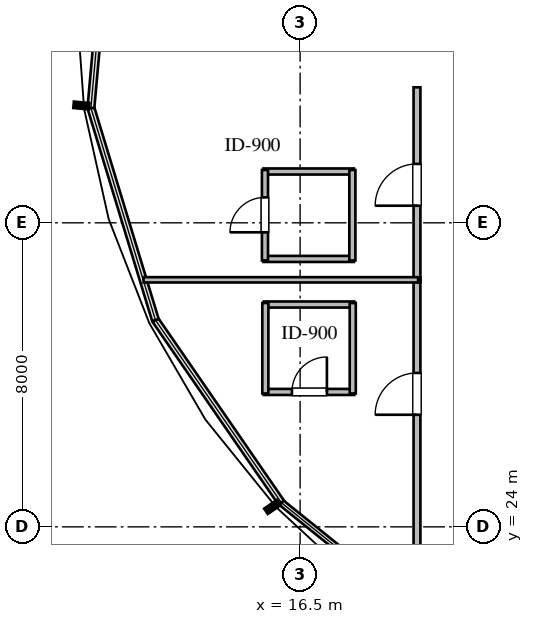
"""IFC4 building model, lengths in metres.
Left out: names, types, materials, properties, quantities, classifications, styles, units other than length and angle.
Written with IfcOpenShell. Run it as: python <this file> out.ifc"""

import sys

from ifc_helpers import new_model, si_unit, direction, frame, frame_2d, origin, place, context, subcontext, project, spatial, rectangle, extrude, element, fill, save


model = new_model("IFC4")
c1 = context("Model", 3, precision=1e-05, world=origin(), true_north=direction((0.0, 1.0)))
c2 = subcontext(c1, "Body", "Model", "MODEL_VIEW")
j1 = project(units=[si_unit("LENGTHUNIT", "METRE"), si_unit("PLANEANGLEUNIT", "RADIAN")], contexts=[c1])
p1 = place(None, origin())
s1 = spatial("IfcSite", under=j1, at=p1, CompositionType="ELEMENT")
p2 = place(p1, origin())
s2 = spatial("IfcBuilding", under=s1, at=p2, CompositionType="ELEMENT")
p3 = place(p2, frame((0.0, 0.0, 149.4)))
s3 = spatial("IfcBuildingStorey", under=s2, at=p3, CompositionType="ELEMENT", Elevation=149.4)
p4 = place(p3, frame((15.545, 27.55, 0.0), z_axis=(0.0, 0.0, 1.0), x_axis=(1.0, 0.0, 0.0)))
e1 = element("IfcWall", 1, at=p4, inside=s3, PredefinedType="PLUMBINGWALL", context=c2, shape_type="SweptSolid", body=[
    extrude(rectangle(XDim=2.38, YDim=0.16, at=frame_2d((1.19, 0.0))), origin(), (0.0, 0.0, 1.0), 3.36),
])
p5 = place(p4, frame((0.74, 0.0, 0.0)))
e2 = element("IfcOpeningElement", 2, at=p5, cuts=e1, PredefinedType="OPENING", context=c2, shape_type="SweptSolid", body=[
    extrude(rectangle(XDim=0.92, YDim=2.1, at=frame_2d((0.46, 1.05))), frame((0.0, 0.09, 0.0), z_axis=(0.0, -1.0, 0.0), x_axis=(1.0, 0.0, 0.0)), (0.0, 0.0, 1.0), 0.18),
])
p6 = place(p3, frame((15.545, 29.85, 0.0), z_axis=(0.0, 0.0, 1.0), x_axis=(1.0, 0.0, 0.0)))
e3 = element("IfcWall", 3, at=p6, inside=s3, PredefinedType="PLUMBINGWALL", context=c2, shape_type="SweptSolid", body=[
    extrude(rectangle(XDim=2.38, YDim=0.16, at=frame_2d((1.19, 0.0))), origin(), (0.0, 0.0, 1.0), 3.36),
])
for number, where, z_axis, x_axis in (
    (4, (15.585, 27.51, 0.0), (0.0, 0.0, 1.0), (0.0, 1.0, 0.0)),
    (5, (17.885, 27.51, 0.0), (0.0, 0.0, 1.0), (0.0, 1.0, 0.0)),
):
    element("IfcWall", number, at=place(p3, frame(where, z_axis=z_axis, x_axis=x_axis)), inside=s3, PredefinedType="PLUMBINGWALL", context=c2, shape_type="SweptSolid", body=[
        extrude(rectangle(XDim=2.38, YDim=0.16, at=frame_2d((1.19, 0.0))), origin(), (0.0, 0.0, 1.0), 3.36),
    ])
for number, where, z_axis, x_axis in (
    (6, (15.535, 31.05, 0.0), (0.0, 0.0, 1.0), (1.0, 0.0, 0.0)),
    (7, (15.535, 33.35, 0.0), (0.0, 0.0, 1.0), (1.0, 0.0, 0.0)),
):
    element("IfcWall", number, at=place(p3, frame(where, z_axis=z_axis, x_axis=x_axis)), inside=s3, PredefinedType="PLUMBINGWALL", context=c2, shape_type="SweptSolid", body=[
        extrude(rectangle(XDim=2.38, YDim=0.16, at=frame_2d((1.19, 0.0))), origin(), (0.0, 0.0, 1.0), 3.36),
    ])
p7 = place(p3, frame((15.575, 31.01, 0.0), z_axis=(0.0, 0.0, 1.0), x_axis=(0.0, 1.0, 0.0)))
e8 = element("IfcWall", 8, at=p7, inside=s3, PredefinedType="PLUMBINGWALL", context=c2, shape_type="SweptSolid", body=[
    extrude(rectangle(XDim=2.38, YDim=0.16, at=frame_2d((1.19, 0.0))), origin(), (0.0, 0.0, 1.0), 3.36),
])
p8 = place(p7, frame((0.74, 0.0, 0.0)))
e9 = element("IfcOpeningElement", 9, at=p8, cuts=e8, PredefinedType="OPENING", context=c2, shape_type="SweptSolid", body=[
    extrude(rectangle(XDim=0.92, YDim=2.1, at=frame_2d((0.46, 1.05))), frame((0.0, 0.09, 0.0), z_axis=(0.0, -1.0, 0.0), x_axis=(1.0, 0.0, 0.0)), (0.0, 0.0, 1.0), 0.18),
])
p9 = place(p3, frame((17.875, 31.01, 0.0), z_axis=(0.0, 0.0, 1.0), x_axis=(0.0, 1.0, 0.0)))
e10 = element("IfcWall", 10, at=p9, inside=s3, PredefinedType="PLUMBINGWALL", context=c2, shape_type="SweptSolid", body=[
    extrude(rectangle(XDim=2.38, YDim=0.16, at=frame_2d((1.19, 0.0))), origin(), (0.0, 0.0, 1.0), 3.36),
])
p10 = place(p3, frame((19.575, 21.775, 0.0), z_axis=(0.0, 0.0, 1.0), x_axis=(0.0, 1.0, 0.0)))
e11 = element("IfcWall", 11, at=p10, inside=s3, PredefinedType="PARTITIONING", context=c2, shape_type="SweptSolid", body=[
    extrude(rectangle(XDim=8.79, YDim=0.18, at=frame_2d((4.395, 0.0))), origin(), (0.0, 0.0, 1.0), 2.657),
])
p11 = place(p10, frame((5.175, 0.0, 0.0)))
e12 = element("IfcOpeningElement", 12, at=p11, cuts=e11, PredefinedType="OPENING", context=c2, shape_type="SweptSolid", body=[
    extrude(rectangle(XDim=1.1, YDim=2.1, at=frame_2d((0.55, 1.05))), frame((0.0, 0.1, 0.0), z_axis=(0.0, -1.0, 0.0), x_axis=(1.0, 0.0, 0.0)), (0.0, 0.0, 1.0), 0.2),
])
p12 = place(p3, frame((19.575, 30.435, 0.0), z_axis=(0.0, 0.0, 1.0), x_axis=(0.0, 1.0, 0.0)))
e13 = element("IfcWall", 13, at=p12, inside=s3, PredefinedType="PARTITIONING", context=c2, shape_type="SweptSolid", body=[
    extrude(rectangle(XDim=5.13, YDim=0.18, at=frame_2d((2.565, 0.0))), origin(), (0.0, 0.0, 1.0), 2.657),
])
p13 = place(p12, frame((2.015, 0.0, 0.0)))
e14 = element("IfcOpeningElement", 14, at=p13, cuts=e13, PredefinedType="OPENING", context=c2, shape_type="SweptSolid", body=[
    extrude(rectangle(XDim=1.1, YDim=2.1, at=frame_2d((0.55, 1.05))), frame((0.0, 0.1, 0.0), z_axis=(0.0, -1.0, 0.0), x_axis=(1.0, 0.0, 0.0)), (0.0, 0.0, 1.0), 0.2),
])
p14 = place(p3, frame((12.381, 30.5, 0.0), z_axis=(0.0, 0.0, 1.0), x_axis=(1.0, 0.0, 0.0)))
e15 = element("IfcWall", 15, at=p14, inside=s3, PredefinedType="PARTITIONING", context=c2, shape_type="SweptSolid", body=[
    extrude(rectangle(XDim=7.224, YDim=0.14, at=frame_2d((3.612, 0.0))), origin(), (0.0, 0.0, 1.0), 3.36),
])
p15 = place(p5, origin())
e16 = element("IfcDoor", 16, at=p15, inside=s3, OperationType="SINGLE_SWING_RIGHT", PredefinedType="DOOR", context=c2, shape_type="SweptSolid", body=[
    extrude(rectangle(XDim=0.92, YDim=2.1, at=frame_2d((0.46, 1.05))), frame((0.0, 0.025, 0.0), z_axis=(0.0, -1.0, 0.0), x_axis=(1.0, 0.0, 0.0)), (0.0, 0.0, 1.0), 0.05),
])
fill(e2, e16)
p16 = place(p8, origin())
e17 = element("IfcDoor", 17, at=p16, inside=s3, OperationType="SINGLE_SWING_LEFT", PredefinedType="DOOR", context=c2, shape_type="SweptSolid", body=[
    extrude(rectangle(XDim=0.92, YDim=2.1, at=frame_2d((0.46, 1.05))), frame((0.0, 0.025, 0.0), z_axis=(0.0, -1.0, 0.0), x_axis=(1.0, 0.0, 0.0)), (0.0, 0.0, 1.0), 0.05),
])
fill(e9, e17)
p17 = place(p11, origin())
e18 = element("IfcDoor", 18, at=p17, inside=s3, OperationType="SINGLE_SWING_LEFT", PredefinedType="DOOR", context=c2, shape_type="SweptSolid", body=[
    extrude(rectangle(XDim=1.1, YDim=2.1, at=frame_2d((0.55, 1.05))), frame((0.0, 0.025, 0.0), z_axis=(0.0, -1.0, 0.0), x_axis=(1.0, 0.0, 0.0)), (0.0, 0.0, 1.0), 0.05),
])
fill(e12, e18)
p18 = place(p13, origin())
e19 = element("IfcDoor", 19, at=p18, inside=s3, OperationType="SINGLE_SWING_LEFT", PredefinedType="DOOR", context=c2, shape_type="SweptSolid", body=[
    extrude(rectangle(XDim=1.1, YDim=2.1, at=frame_2d((0.55, 1.05))), frame((0.0, 0.025, 0.0), z_axis=(0.0, -1.0, 0.0), x_axis=(1.0, 0.0, 0.0)), (0.0, 0.0, 1.0), 0.05),
])
fill(e14, e19)
save(model, sys.argv[1])
